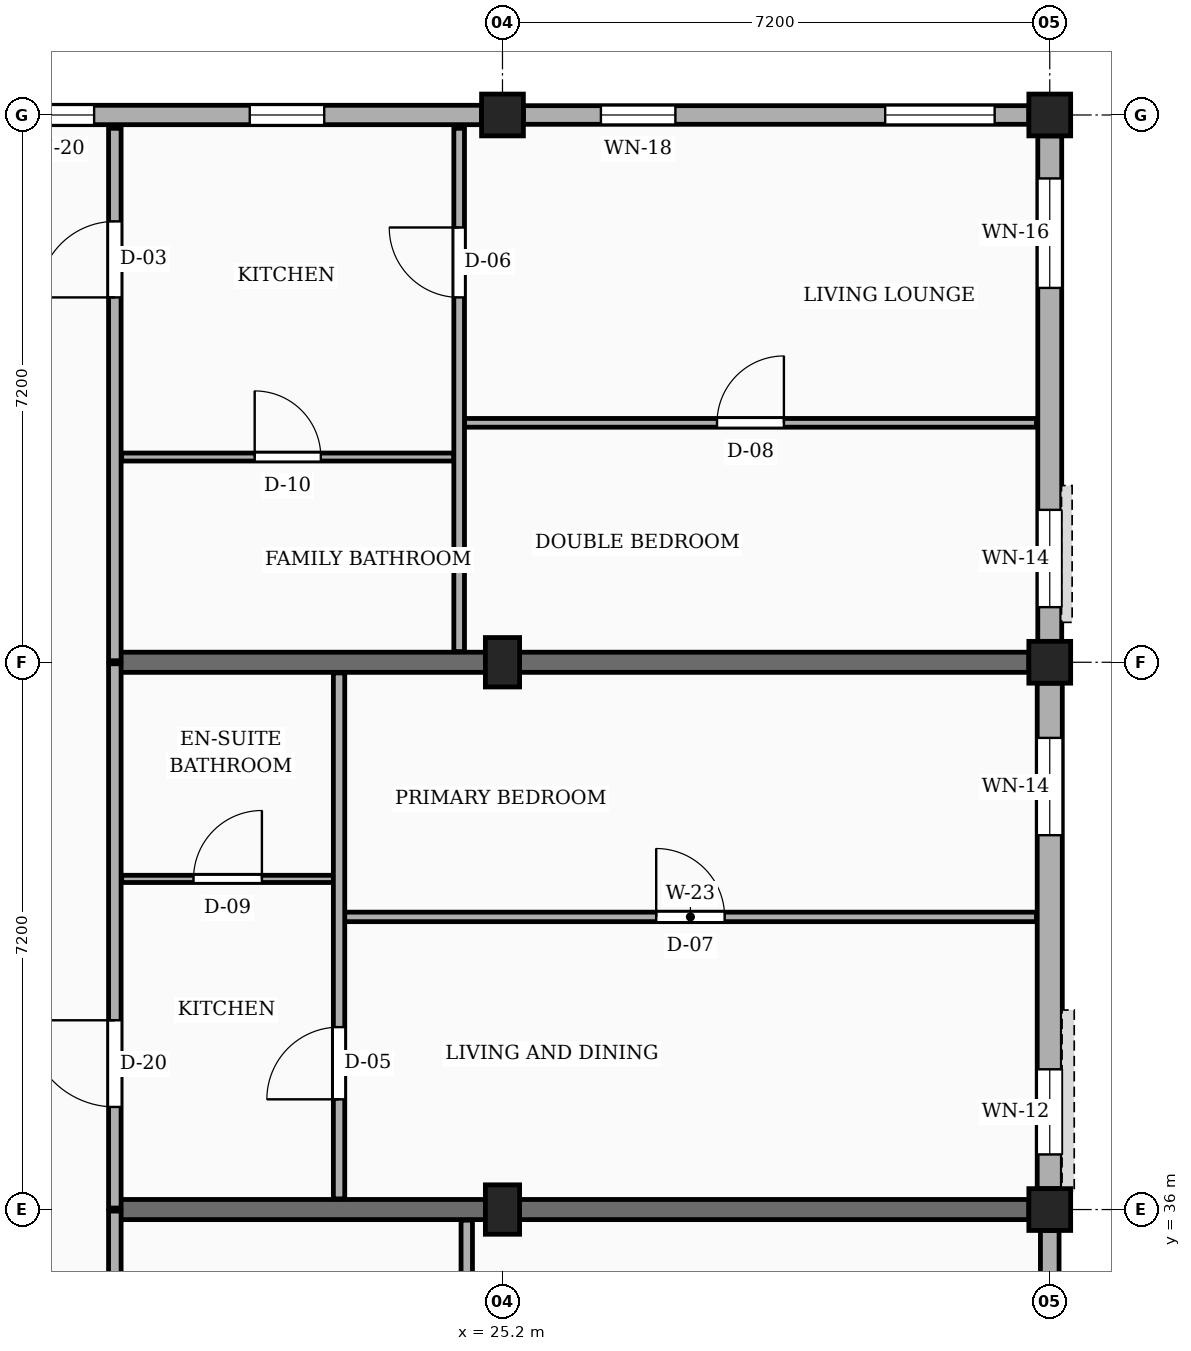
"""IFC4 building model, lengths in metres.
Left out: names, types, materials, properties, quantities, classifications, styles, units other than length and angle.
Written with IfcOpenShell. Run it as: python <this file> out.ifc"""

import sys

from ifc_helpers import new_model, si_unit, direction, frame, frame_2d, origin, origin_2d, place, context, subcontext, project, spatial, rectangle, extrude, element, fill, save


model = new_model("IFC4")
c1 = context("Model", 3, precision=1e-05, world=origin(), true_north=direction((0.0, 1.0)))
c2 = subcontext(c1, "Body", "Model", "MODEL_VIEW")
j1 = project(units=[si_unit("LENGTHUNIT", "METRE"), si_unit("PLANEANGLEUNIT", "RADIAN")], contexts=[c1])
p1 = place(None, origin())
s1 = spatial("IfcSite", under=j1, at=p1, CompositionType="ELEMENT")
p2 = place(p1, origin())
s2 = spatial("IfcBuilding", under=s1, at=p2, CompositionType="ELEMENT")
p3 = place(p2, frame((0.0, 0.0, 10.8)))
s3 = spatial("IfcBuildingStorey", under=s2, at=p3, CompositionType="ELEMENT", Elevation=10.8)
for number, where, z_axis, x_axis in (
    (1, (25.2, 36.0, 0.0), (0.0, 0.0, 1.0), (1.0, 0.0, 0.0)),
    (2, (25.2, 43.2, 0.0), (0.0, 0.0, 1.0), (1.0, 0.0, 0.0)),
):
    element("IfcColumn", number, at=place(p3, frame(where, z_axis=z_axis, x_axis=x_axis)), inside=s3, PredefinedType="COLUMN", context=c2, shape_type="SweptSolid", body=[
        extrude(rectangle(XDim=0.45, YDim=0.65, at=origin_2d()), origin(), (0.0, 0.0, 1.0), 3.15),
    ])
for number, where, z_axis, x_axis in (
    (3, (25.2, 50.4, 0.0), (0.0, 0.0, 1.0), (1.0, 0.0, 0.0)),
    (4, (32.4, 36.0, 0.0), (0.0, 0.0, 1.0), (1.0, 0.0, 0.0)),
    (5, (32.4, 43.2, 0.0), (0.0, 0.0, 1.0), (1.0, 0.0, 0.0)),
    (6, (32.4, 50.4, 0.0), (0.0, 0.0, 1.0), (1.0, 0.0, 0.0)),
):
    element("IfcColumn", number, at=place(p3, frame(where, z_axis=z_axis, x_axis=x_axis)), inside=s3, PredefinedType="COLUMN", context=c2, shape_type="SweptSolid", body=[
        extrude(rectangle(XDim=0.55, YDim=0.55, at=origin_2d()), origin(), (0.0, 0.0, 1.0), 3.15),
    ])
for number, where, z_axis, x_axis in (
    (7, (20.1, 36.0, 0.0), (0.0, 0.0, 1.0), (1.0, 0.0, 0.0)),
    (8, (20.1, 43.2, 0.0), (0.0, 0.0, 1.0), (1.0, 0.0, 0.0)),
):
    element("IfcWall", number, at=place(p3, frame(where, z_axis=z_axis, x_axis=x_axis)), inside=s3, PredefinedType="SOLIDWALL", context=c2, shape_type="SweptSolid", body=[
        extrude(rectangle(XDim=12.025, YDim=0.265, at=frame_2d((6.012, 0.0))), origin(), (0.0, 0.0, 1.0), 2.17),
    ])
p4 = place(p3, frame((32.4, 29.075, 0.0), z_axis=(0.0, 0.0, 1.0), x_axis=(0.0, 1.0, 0.0)))
e9 = element("IfcWall", 9, at=p4, inside=s3, PredefinedType="SOLIDWALL", context=c2, shape_type="SweptSolid", body=[
    extrude(rectangle(XDim=6.65, YDim=0.245, at=frame_2d((3.325, 0.0))), origin(), (0.0, 0.0, 1.0), 2.44),
])
p5 = place(p4, frame((0.45, 0.0, 0.78)))
e10 = element("IfcOpeningElement", 10, at=p5, cuts=e9, PredefinedType="OPENING", context=c2, shape_type="SweptSolid", body=[
    extrude(rectangle(XDim=0.96, YDim=1.26, at=frame_2d((0.48, 0.63))), frame((0.0, 0.133, 0.0), z_axis=(0.0, -1.0, 0.0), x_axis=(1.0, 0.0, 0.0)), (0.0, 0.0, 1.0), 0.265),
])
p6 = place(p4, frame((4.65, 0.0, 0.78)))
e11 = element("IfcOpeningElement", 11, at=p6, cuts=e9, PredefinedType="OPENING", context=c2, shape_type="SweptSolid", body=[
    extrude(rectangle(XDim=1.12, YDim=1.26, at=frame_2d((0.56, 0.63))), frame((0.0, 0.133, 0.0), z_axis=(0.0, -1.0, 0.0), x_axis=(1.0, 0.0, 0.0)), (0.0, 0.0, 1.0), 0.265),
])
p7 = place(p3, frame((32.4, 36.275, 0.0), z_axis=(0.0, 0.0, 1.0), x_axis=(0.0, 1.0, 0.0)))
e12 = element("IfcWall", 12, at=p7, inside=s3, PredefinedType="SOLIDWALL", context=c2, shape_type="SweptSolid", body=[
    extrude(rectangle(XDim=6.65, YDim=0.33, at=frame_2d((3.325, 0.0))), origin(), (0.0, 0.0, 1.0), 2.44),
])
p8 = place(p7, frame((0.45, 0.0, 0.78)))
e13 = element("IfcOpeningElement", 13, at=p8, cuts=e12, PredefinedType="OPENING", context=c2, shape_type="SweptSolid", body=[
    extrude(rectangle(XDim=1.12, YDim=1.26, at=frame_2d((0.56, 0.63))), frame((0.0, 0.175, 0.0), z_axis=(0.0, -1.0, 0.0), x_axis=(1.0, 0.0, 0.0)), (0.0, 0.0, 1.0), 0.35),
])
p9 = place(p7, frame((4.65, 0.0, 0.78)))
e14 = element("IfcOpeningElement", 14, at=p9, cuts=e12, PredefinedType="OPENING", context=c2, shape_type="SweptSolid", body=[
    extrude(rectangle(XDim=1.28, YDim=1.26, at=frame_2d((0.64, 0.63))), frame((0.0, 0.175, 0.0), z_axis=(0.0, -1.0, 0.0), x_axis=(1.0, 0.0, 0.0)), (0.0, 0.0, 1.0), 0.35),
])
p10 = place(p3, frame((32.4, 43.475, 0.0), z_axis=(0.0, 0.0, 1.0), x_axis=(0.0, 1.0, 0.0)))
e15 = element("IfcWall", 15, at=p10, inside=s3, PredefinedType="SOLIDWALL", context=c2, shape_type="SweptSolid", body=[
    extrude(rectangle(XDim=6.65, YDim=0.315, at=frame_2d((3.325, 0.0))), origin(), (0.0, 0.0, 1.0), 2.44),
])
p11 = place(p10, frame((0.45, 0.0, 0.78)))
e16 = element("IfcOpeningElement", 16, at=p11, cuts=e15, PredefinedType="OPENING", context=c2, shape_type="SweptSolid", body=[
    extrude(rectangle(XDim=1.28, YDim=1.26, at=frame_2d((0.64, 0.63))), frame((0.0, 0.167, 0.0), z_axis=(0.0, -1.0, 0.0), x_axis=(1.0, 0.0, 0.0)), (0.0, 0.0, 1.0), 0.335),
])
p12 = place(p10, frame((4.65, 0.0, 0.78)))
e17 = element("IfcOpeningElement", 17, at=p12, cuts=e15, PredefinedType="OPENING", context=c2, shape_type="SweptSolid", body=[
    extrude(rectangle(XDim=1.44, YDim=1.26, at=frame_2d((0.72, 0.63))), frame((0.0, 0.167, 0.0), z_axis=(0.0, -1.0, 0.0), x_axis=(1.0, 0.0, 0.0)), (0.0, 0.0, 1.0), 0.335),
])
p13 = place(p3, frame((32.125, 50.4, 0.0), z_axis=(0.0, 0.0, 1.0), x_axis=(-1.0, 0.0, 0.0)))
e18 = element("IfcWall", 18, at=p13, inside=s3, PredefinedType="SOLIDWALL", context=c2, shape_type="SweptSolid", body=[
    extrude(rectangle(XDim=6.65, YDim=0.245, at=frame_2d((3.325, 0.0))), origin(), (0.0, 0.0, 1.0), 2.44),
])
p14 = place(p13, frame((0.45, 0.0, 0.78)))
e19 = element("IfcOpeningElement", 19, at=p14, cuts=e18, PredefinedType="OPENING", context=c2, shape_type="SweptSolid", body=[
    extrude(rectangle(XDim=1.44, YDim=1.26, at=frame_2d((0.72, 0.63))), frame((0.0, 0.133, 0.0), z_axis=(0.0, -1.0, 0.0), x_axis=(1.0, 0.0, 0.0)), (0.0, 0.0, 1.0), 0.265),
])
p15 = place(p13, frame((4.65, 0.0, 0.78)))
e20 = element("IfcOpeningElement", 20, at=p15, cuts=e18, PredefinedType="OPENING", context=c2, shape_type="SweptSolid", body=[
    extrude(rectangle(XDim=0.98, YDim=1.36, at=frame_2d((0.49, 0.68))), frame((0.0, 0.133, 0.0), z_axis=(0.0, -1.0, 0.0), x_axis=(1.0, 0.0, 0.0)), (0.0, 0.0, 1.0), 0.265),
])
p16 = place(p3, frame((24.925, 50.4, 0.0), z_axis=(0.0, 0.0, 1.0), x_axis=(-1.0, 0.0, 0.0)))
e21 = element("IfcWall", 21, at=p16, inside=s3, PredefinedType="SOLIDWALL", context=c2, shape_type="SweptSolid", body=[
    extrude(rectangle(XDim=6.65, YDim=0.255, at=frame_2d((3.325, 0.0))), origin(), (0.0, 0.0, 1.0), 2.44),
])
p17 = place(p16, frame((2.07, 0.0, 0.78)))
e22 = element("IfcOpeningElement", 22, at=p17, cuts=e21, PredefinedType="OPENING", context=c2, shape_type="SweptSolid", body=[
    extrude(rectangle(XDim=0.98, YDim=1.36, at=frame_2d((0.49, 0.68))), frame((0.0, 0.137, 0.0), z_axis=(0.0, -1.0, 0.0), x_axis=(1.0, 0.0, 0.0)), (0.0, 0.0, 1.0), 0.275),
])
p18 = place(p16, frame((5.097, 0.0, 0.78)))
e23 = element("IfcOpeningElement", 23, at=p18, cuts=e21, PredefinedType="OPENING", context=c2, shape_type="SweptSolid", body=[
    extrude(rectangle(XDim=1.14, YDim=1.36, at=frame_2d((0.57, 0.68))), frame((0.0, 0.137, 0.0), z_axis=(0.0, -1.0, 0.0), x_axis=(1.0, 0.0, 0.0)), (0.0, 0.0, 1.0), 0.275),
])
p19 = place(p3, frame((20.1, 28.82, 0.0), z_axis=(0.0, 0.0, 1.0), x_axis=(0.0, 1.0, 0.0)))
e24 = element("IfcWall", 24, at=p19, inside=s3, PredefinedType="PARTITIONING", context=c2, shape_type="SweptSolid", body=[
    extrude(rectangle(XDim=7.16, YDim=0.165, at=frame_2d((3.58, 0.0))), origin(), (0.0, 0.0, 1.0), 2.305),
])
p20 = place(p19, frame((4.78, 0.0, 0.0)))
e25 = element("IfcOpeningElement", 25, at=p20, cuts=e24, PredefinedType="OPENING", context=c2, shape_type="SweptSolid", body=[
    extrude(rectangle(XDim=0.94, YDim=2.12, at=frame_2d((0.47, 1.06))), frame((0.0, 0.093, 0.0), z_axis=(0.0, -1.0, 0.0), x_axis=(1.0, 0.0, 0.0)), (0.0, 0.0, 1.0), 0.185),
])
p21 = place(p3, frame((20.1, 36.02, 0.0), z_axis=(0.0, 0.0, 1.0), x_axis=(0.0, 1.0, 0.0)))
e26 = element("IfcWall", 26, at=p21, inside=s3, PredefinedType="PARTITIONING", context=c2, shape_type="SweptSolid", body=[
    extrude(rectangle(XDim=7.16, YDim=0.165, at=frame_2d((3.58, 0.0))), origin(), (0.0, 0.0, 1.0), 2.305),
])
p22 = place(p21, frame((1.33, 0.0, 0.0)))
e27 = element("IfcOpeningElement", 27, at=p22, cuts=e26, PredefinedType="OPENING", context=c2, shape_type="SweptSolid", body=[
    extrude(rectangle(XDim=1.14, YDim=2.18, at=frame_2d((0.57, 1.09))), frame((0.0, 0.093, 0.0), z_axis=(0.0, -1.0, 0.0), x_axis=(1.0, 0.0, 0.0)), (0.0, 0.0, 1.0), 0.185),
])
p23 = place(p3, frame((20.1, 43.22, 0.0), z_axis=(0.0, 0.0, 1.0), x_axis=(0.0, 1.0, 0.0)))
e28 = element("IfcWall", 28, at=p23, inside=s3, PredefinedType="PARTITIONING", context=c2, shape_type="SweptSolid", body=[
    extrude(rectangle(XDim=7.005, YDim=0.165, at=frame_2d((3.502, 0.0))), origin(), (0.0, 0.0, 1.0), 2.305),
])
p24 = place(p23, frame((4.78, 0.0, 0.0)))
e29 = element("IfcOpeningElement", 29, at=p24, cuts=e28, PredefinedType="OPENING", context=c2, shape_type="SweptSolid", body=[
    extrude(rectangle(XDim=1.0, YDim=2.15, at=frame_2d((0.5, 1.075))), frame((0.0, 0.093, 0.0), z_axis=(0.0, -1.0, 0.0), x_axis=(1.0, 0.0, 0.0)), (0.0, 0.0, 1.0), 0.185),
])
p25 = place(p3, frame((24.73, 28.94, 0.0), z_axis=(0.0, 0.0, 1.0), x_axis=(0.0, 1.0, 0.0)))
e30 = element("IfcWall", 30, at=p25, inside=s3, PredefinedType="PARTITIONING", context=c2, shape_type="SweptSolid", body=[
    extrude(rectangle(XDim=6.92, YDim=0.15, at=frame_2d((3.46, 0.0))), origin(), (0.0, 0.0, 1.0), 2.305),
])
p26 = place(p25, frame((4.66, 0.0, 0.0)))
e31 = element("IfcOpeningElement", 31, at=p26, cuts=e30, PredefinedType="OPENING", context=c2, shape_type="SweptSolid", body=[
    extrude(rectangle(XDim=0.95, YDim=2.1, at=frame_2d((0.475, 1.05))), frame((0.0, 0.085, 0.0), z_axis=(0.0, -1.0, 0.0), x_axis=(1.0, 0.0, 0.0)), (0.0, 0.0, 1.0), 0.17),
])
p27 = place(p3, frame((23.12, 39.85, 0.0), z_axis=(0.0, 0.0, 1.0), x_axis=(1.0, 0.0, 0.0)))
e32 = element("IfcWall", 32, at=p27, inside=s3, PredefinedType="PARTITIONING", context=c2, shape_type="SweptSolid", body=[
    extrude(rectangle(XDim=9.105, YDim=0.125, at=frame_2d((4.552, 0.0))), origin(), (0.0, 0.0, 1.0), 2.305),
])
p28 = place(p27, frame((4.103, 0.0, 0.0)))
e33 = element("IfcOpeningElement", 33, at=p28, cuts=e32, PredefinedType="OPENING", context=c2, shape_type="SweptSolid", body=[
    extrude(rectangle(XDim=0.9, YDim=2.1, at=frame_2d((0.45, 1.05))), frame((0.0, 0.073, 0.0), z_axis=(0.0, -1.0, 0.0), x_axis=(1.0, 0.0, 0.0)), (0.0, 0.0, 1.0), 0.145),
])
p29 = place(p3, frame((20.19, 40.35, 0.0), z_axis=(0.0, 0.0, 1.0), x_axis=(1.0, 0.0, 0.0)))
e34 = element("IfcWall", 34, at=p29, inside=s3, PredefinedType="PARTITIONING", context=c2, shape_type="SweptSolid", body=[
    extrude(rectangle(XDim=2.79, YDim=0.095, at=frame_2d((1.395, 0.0))), origin(), (0.0, 0.0, 1.0), 2.305),
])
p30 = place(p29, frame((0.945, 0.0, 0.0)))
e35 = element("IfcOpeningElement", 35, at=p30, cuts=e34, PredefinedType="OPENING", context=c2, shape_type="SweptSolid", body=[
    extrude(rectangle(XDim=0.9, YDim=2.05, at=frame_2d((0.45, 1.025))), frame((0.0, 0.058, 0.0), z_axis=(0.0, -1.0, 0.0), x_axis=(1.0, 0.0, 0.0)), (0.0, 0.0, 1.0), 0.115),
])
p31 = place(p3, frame((23.05, 36.14, 0.0), z_axis=(0.0, 0.0, 1.0), x_axis=(0.0, 1.0, 0.0)))
e36 = element("IfcWall", 36, at=p31, inside=s3, PredefinedType="PARTITIONING", context=c2, shape_type="SweptSolid", body=[
    extrude(rectangle(XDim=6.92, YDim=0.15, at=frame_2d((3.46, 0.0))), origin(), (0.0, 0.0, 1.0), 2.305),
])
p32 = place(p31, frame((1.31, 0.0, 0.0)))
e37 = element("IfcOpeningElement", 37, at=p32, cuts=e36, PredefinedType="OPENING", context=c2, shape_type="SweptSolid", body=[
    extrude(rectangle(XDim=0.95, YDim=2.1, at=frame_2d((0.475, 1.05))), frame((0.0, 0.085, 0.0), z_axis=(0.0, -1.0, 0.0), x_axis=(1.0, 0.0, 0.0)), (0.0, 0.0, 1.0), 0.17),
])
p33 = place(p3, frame((24.7, 46.35, 0.0), z_axis=(0.0, 0.0, 1.0), x_axis=(1.0, 0.0, 0.0)))
e38 = element("IfcWall", 38, at=p33, inside=s3, PredefinedType="PARTITIONING", context=c2, shape_type="SweptSolid", body=[
    extrude(rectangle(XDim=7.525, YDim=0.115, at=frame_2d((3.763, 0.0))), origin(), (0.0, 0.0, 1.0), 2.305),
])
p34 = place(p33, frame((3.323, 0.0, 0.0)))
e39 = element("IfcOpeningElement", 39, at=p34, cuts=e38, PredefinedType="OPENING", context=c2, shape_type="SweptSolid", body=[
    extrude(rectangle(XDim=0.88, YDim=2.08, at=frame_2d((0.44, 1.04))), frame((0.0, 0.067, 0.0), z_axis=(0.0, -1.0, 0.0), x_axis=(1.0, 0.0, 0.0)), (0.0, 0.0, 1.0), 0.135),
])
p35 = place(p3, frame((20.19, 45.9, 0.0), z_axis=(0.0, 0.0, 1.0), x_axis=(1.0, 0.0, 0.0)))
e40 = element("IfcWall", 40, at=p35, inside=s3, PredefinedType="PARTITIONING", context=c2, shape_type="SweptSolid", body=[
    extrude(rectangle(XDim=4.37, YDim=0.105, at=frame_2d((2.185, 0.0))), origin(), (0.0, 0.0, 1.0), 2.305),
])
p36 = place(p35, frame((1.75, 0.0, 0.0)))
e41 = element("IfcOpeningElement", 41, at=p36, cuts=e40, PredefinedType="OPENING", context=c2, shape_type="SweptSolid", body=[
    extrude(rectangle(XDim=0.87, YDim=2.05, at=frame_2d((0.435, 1.025))), frame((0.0, 0.062, 0.0), z_axis=(0.0, -1.0, 0.0), x_axis=(1.0, 0.0, 0.0)), (0.0, 0.0, 1.0), 0.125),
])
p37 = place(p3, frame((24.63, 43.34, 0.0), z_axis=(0.0, 0.0, 1.0), x_axis=(0.0, 1.0, 0.0)))
e42 = element("IfcWall", 42, at=p37, inside=s3, PredefinedType="PARTITIONING", context=c2, shape_type="SweptSolid", body=[
    extrude(rectangle(XDim=6.885, YDim=0.14, at=frame_2d((3.442, 0.0))), origin(), (0.0, 0.0, 1.0), 2.305),
])
p38 = place(p37, frame((4.66, 0.0, 0.0)))
e43 = element("IfcOpeningElement", 43, at=p38, cuts=e42, PredefinedType="OPENING", context=c2, shape_type="SweptSolid", body=[
    extrude(rectangle(XDim=0.92, YDim=2.1, at=frame_2d((0.46, 1.05))), frame((0.0, 0.08, 0.0), z_axis=(0.0, -1.0, 0.0), x_axis=(1.0, 0.0, 0.0)), (0.0, 0.0, 1.0), 0.16),
])
p39 = place(p8, origin())
e44 = element("IfcWindow", 44, at=p39, inside=s3, PartitioningType="SINGLE_PANEL", PredefinedType="WINDOW", context=c2, shape_type="SweptSolid", body=[
    extrude(rectangle(XDim=1.12, YDim=1.26, at=frame_2d((0.56, 0.63))), frame((0.0, 0.03, 0.0), z_axis=(0.0, -1.0, 0.0), x_axis=(1.0, 0.0, 0.0)), (0.0, 0.0, 1.0), 0.06),
])
fill(e13, e44)
p40 = place(p9, origin())
e45 = element("IfcWindow", 45, at=p40, inside=s3, PartitioningType="SINGLE_PANEL", PredefinedType="WINDOW", context=c2, shape_type="SweptSolid", body=[
    extrude(rectangle(XDim=1.28, YDim=1.26, at=frame_2d((0.64, 0.63))), frame((0.0, 0.03, 0.0), z_axis=(0.0, -1.0, 0.0), x_axis=(1.0, 0.0, 0.0)), (0.0, 0.0, 1.0), 0.06),
])
fill(e14, e45)
p41 = place(p11, origin())
e46 = element("IfcWindow", 46, at=p41, inside=s3, PartitioningType="SINGLE_PANEL", PredefinedType="WINDOW", context=c2, shape_type="SweptSolid", body=[
    extrude(rectangle(XDim=1.28, YDim=1.26, at=frame_2d((0.64, 0.63))), frame((0.0, 0.03, 0.0), z_axis=(0.0, -1.0, 0.0), x_axis=(1.0, 0.0, 0.0)), (0.0, 0.0, 1.0), 0.06),
])
fill(e16, e46)
p42 = place(p12, origin())
e47 = element("IfcWindow", 47, at=p42, inside=s3, PartitioningType="SINGLE_PANEL", PredefinedType="WINDOW", context=c2, shape_type="SweptSolid", body=[
    extrude(rectangle(XDim=1.44, YDim=1.26, at=frame_2d((0.72, 0.63))), frame((0.0, 0.03, 0.0), z_axis=(0.0, -1.0, 0.0), x_axis=(1.0, 0.0, 0.0)), (0.0, 0.0, 1.0), 0.06),
])
fill(e17, e47)
p43 = place(p14, origin())
e48 = element("IfcWindow", 48, at=p43, inside=s3, PartitioningType="SINGLE_PANEL", PredefinedType="WINDOW", context=c2, shape_type="SweptSolid", body=[
    extrude(rectangle(XDim=1.44, YDim=1.26, at=frame_2d((0.72, 0.63))), frame((0.0, 0.03, 0.0), z_axis=(0.0, -1.0, 0.0), x_axis=(1.0, 0.0, 0.0)), (0.0, 0.0, 1.0), 0.06),
])
fill(e19, e48)
p44 = place(p15, origin())
e49 = element("IfcWindow", 49, at=p44, inside=s3, PartitioningType="SINGLE_PANEL", PredefinedType="WINDOW", context=c2, shape_type="SweptSolid", body=[
    extrude(rectangle(XDim=0.98, YDim=1.36, at=frame_2d((0.49, 0.68))), frame((0.0, 0.03, 0.0), z_axis=(0.0, -1.0, 0.0), x_axis=(1.0, 0.0, 0.0)), (0.0, 0.0, 1.0), 0.06),
])
fill(e20, e49)
p45 = place(p17, origin())
e50 = element("IfcWindow", 50, at=p45, inside=s3, PartitioningType="SINGLE_PANEL", PredefinedType="WINDOW", context=c2, shape_type="SweptSolid", body=[
    extrude(rectangle(XDim=0.98, YDim=1.36, at=frame_2d((0.49, 0.68))), frame((0.0, 0.03, 0.0), z_axis=(0.0, -1.0, 0.0), x_axis=(1.0, 0.0, 0.0)), (0.0, 0.0, 1.0), 0.06),
])
fill(e22, e50)
p46 = place(p18, origin())
e51 = element("IfcWindow", 51, at=p46, inside=s3, PartitioningType="SINGLE_PANEL", PredefinedType="WINDOW", context=c2, shape_type="SweptSolid", body=[
    extrude(rectangle(XDim=1.14, YDim=1.36, at=frame_2d((0.57, 0.68))), frame((0.0, 0.03, 0.0), z_axis=(0.0, -1.0, 0.0), x_axis=(1.0, 0.0, 0.0)), (0.0, 0.0, 1.0), 0.06),
])
fill(e23, e51)
p47 = place(p22, origin())
e52 = element("IfcDoor", 52, at=p47, inside=s3, OperationType="SINGLE_SWING_RIGHT", PredefinedType="DOOR", context=c2, shape_type="SweptSolid", body=[
    extrude(rectangle(XDim=1.14, YDim=2.18, at=frame_2d((0.57, 1.09))), frame((0.0, 0.025, 0.0), z_axis=(0.0, -1.0, 0.0), x_axis=(1.0, 0.0, 0.0)), (0.0, 0.0, 1.0), 0.05),
])
fill(e27, e52)
p48 = place(p24, origin())
e53 = element("IfcDoor", 53, at=p48, inside=s3, OperationType="SINGLE_SWING_LEFT", PredefinedType="DOOR", context=c2, shape_type="SweptSolid", body=[
    extrude(rectangle(XDim=1.0, YDim=2.15, at=frame_2d((0.5, 1.075))), frame((0.0, 0.025, 0.0), z_axis=(0.0, -1.0, 0.0), x_axis=(1.0, 0.0, 0.0)), (0.0, 0.0, 1.0), 0.05),
])
fill(e29, e53)
p49 = place(p28, origin())
e54 = element("IfcDoor", 54, at=p49, inside=s3, OperationType="SINGLE_SWING_LEFT", PredefinedType="DOOR", context=c2, shape_type="SweptSolid", body=[
    extrude(rectangle(XDim=0.9, YDim=2.1, at=frame_2d((0.45, 1.05))), frame((0.0, 0.025, 0.0), z_axis=(0.0, -1.0, 0.0), x_axis=(1.0, 0.0, 0.0)), (0.0, 0.0, 1.0), 0.05),
])
fill(e33, e54)
p50 = place(p30, origin())
e55 = element("IfcDoor", 55, at=p50, inside=s3, OperationType="SINGLE_SWING_RIGHT", PredefinedType="DOOR", context=c2, shape_type="SweptSolid", body=[
    extrude(rectangle(XDim=0.9, YDim=2.05, at=frame_2d((0.45, 1.025))), frame((0.0, 0.025, 0.0), z_axis=(0.0, -1.0, 0.0), x_axis=(1.0, 0.0, 0.0)), (0.0, 0.0, 1.0), 0.05),
])
fill(e35, e55)
p51 = place(p32, origin())
e56 = element("IfcDoor", 56, at=p51, inside=s3, OperationType="SINGLE_SWING_LEFT", PredefinedType="DOOR", context=c2, shape_type="SweptSolid", body=[
    extrude(rectangle(XDim=0.95, YDim=2.1, at=frame_2d((0.475, 1.05))), frame((0.0, 0.025, 0.0), z_axis=(0.0, -1.0, 0.0), x_axis=(1.0, 0.0, 0.0)), (0.0, 0.0, 1.0), 0.05),
])
fill(e37, e56)
p52 = place(p34, origin())
e57 = element("IfcDoor", 57, at=p52, inside=s3, OperationType="SINGLE_SWING_RIGHT", PredefinedType="DOOR", context=c2, shape_type="SweptSolid", body=[
    extrude(rectangle(XDim=0.88, YDim=2.08, at=frame_2d((0.44, 1.04))), frame((0.0, 0.025, 0.0), z_axis=(0.0, -1.0, 0.0), x_axis=(1.0, 0.0, 0.0)), (0.0, 0.0, 1.0), 0.05),
])
fill(e39, e57)
p53 = place(p36, origin())
e58 = element("IfcDoor", 58, at=p53, inside=s3, OperationType="SINGLE_SWING_LEFT", PredefinedType="DOOR", context=c2, shape_type="SweptSolid", body=[
    extrude(rectangle(XDim=0.87, YDim=2.05, at=frame_2d((0.435, 1.025))), frame((0.0, 0.025, 0.0), z_axis=(0.0, -1.0, 0.0), x_axis=(1.0, 0.0, 0.0)), (0.0, 0.0, 1.0), 0.05),
])
fill(e41, e58)
p54 = place(p38, origin())
e59 = element("IfcDoor", 59, at=p54, inside=s3, OperationType="SINGLE_SWING_RIGHT", PredefinedType="DOOR", context=c2, shape_type="SweptSolid", body=[
    extrude(rectangle(XDim=0.92, YDim=2.1, at=frame_2d((0.46, 1.05))), frame((0.0, 0.025, 0.0), z_axis=(0.0, -1.0, 0.0), x_axis=(1.0, 0.0, 0.0)), (0.0, 0.0, 1.0), 0.05),
])
fill(e43, e59)
save(model, sys.argv[1])
